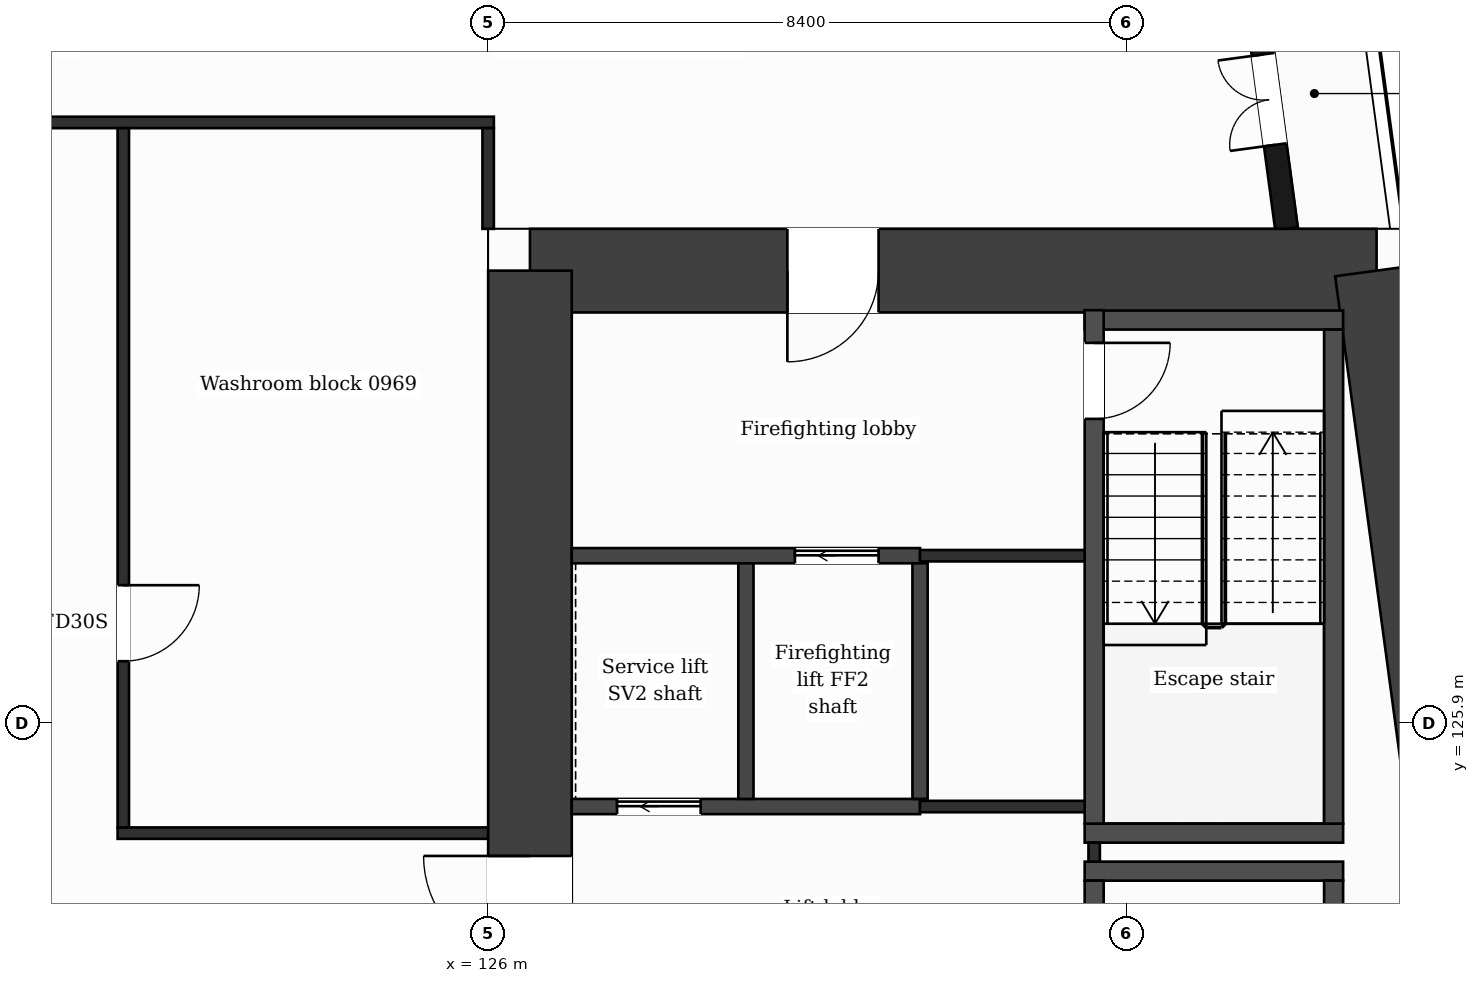
"""IFC4 building model, lengths in metres.
Left out: names, types, materials, properties, quantities, classifications, styles, units other than length and angle.
Written with IfcOpenShell. Run it as: python <this file> out.ifc"""

import sys

from ifc_helpers import new_model, si_unit, direction, frame, frame_2d, origin, place, context, subcontext, project, spatial, rectangle, extrude, element, fill, save


model = new_model("IFC4")
c1 = context("Model", 3, precision=1e-05, world=origin(), true_north=direction((0.0, 1.0)))
c2 = subcontext(c1, "Body", "Model", "MODEL_VIEW")
j1 = project(units=[si_unit("LENGTHUNIT", "METRE"), si_unit("PLANEANGLEUNIT", "RADIAN")], contexts=[c1])
p1 = place(None, origin())
s1 = spatial("IfcSite", under=j1, at=p1, CompositionType="ELEMENT")
p2 = place(p1, origin())
s2 = spatial("IfcBuilding", under=s1, at=p2, CompositionType="ELEMENT")
p3 = place(p2, frame((0.0, 0.0, 49.5)))
s3 = spatial("IfcBuildingStorey", under=s2, at=p3, CompositionType="ELEMENT", Elevation=49.5)
p4 = place(p3, frame((126.55, 131.85, 0.0), z_axis=(0.0, 0.0, 1.0), x_axis=(1.0, 0.0, 0.0)))
e1 = element("IfcWall", 1, at=p4, inside=s3, PredefinedType="SHEAR", context=c2, shape_type="SweptSolid", body=[
    extrude(rectangle(XDim=11.138, YDim=1.1, at=frame_2d((5.569, 0.0))), origin(), (0.0, 0.0, 1.0), 3.5),
])
p5 = place(p4, frame((3.386, 0.0, 0.0)))
e2 = element("IfcOpeningElement", 2, at=p5, cuts=e1, PredefinedType="OPENING", context=c2, shape_type="SweptSolid", body=[
    extrude(rectangle(XDim=1.2, YDim=2.1, at=frame_2d((0.6, 1.05))), frame((0.0, 0.56, 0.0), z_axis=(0.0, -1.0, 0.0), x_axis=(1.0, 0.0, 0.0)), (0.0, 0.0, 1.0), 1.12),
])
p6 = place(p3, frame((137.688, 131.85, 0.0), z_axis=(0.0, 0.0, 1.0), x_axis=(0.133411793472, -0.991060691059, 0.0)))
e3 = element("IfcWall", 3, at=p6, inside=s3, PredefinedType="SHEAR", context=c2, shape_type="SweptSolid", body=[
    extrude(rectangle(XDim=21.089, YDim=1.1, at=frame_2d((10.544, 0.0))), origin(), (0.0, 0.0, 1.0), 3.5),
])
p7 = place(p3, frame((126.55, 110.95, 0.0), z_axis=(0.0, 0.0, 1.0), x_axis=(0.0, 1.0, 0.0)))
e4 = element("IfcWall", 4, at=p7, inside=s3, PredefinedType="SHEAR", context=c2, shape_type="SweptSolid", body=[
    extrude(rectangle(XDim=20.9, YDim=1.1, at=frame_2d((10.45, 0.0))), origin(), (0.0, 0.0, 1.0), 3.5),
])
p8 = place(p7, frame((11.8, 0.0, 0.0)))
e5 = element("IfcOpeningElement", 5, at=p8, cuts=e4, PredefinedType="OPENING", context=c2, shape_type="SweptSolid", body=[
    extrude(rectangle(XDim=1.4, YDim=2.1, at=frame_2d((0.7, 1.05))), frame((0.0, 0.56, 0.0), z_axis=(0.0, -1.0, 0.0), x_axis=(1.0, 0.0, 0.0)), (0.0, 0.0, 1.0), 1.12),
])
p9 = place(p3, frame((136.504, 132.4, 0.0), z_axis=(0.0, 0.0, 1.0), x_axis=(-0.133399697462, 0.99106231929, 0.0)))
e6 = element("IfcWall", 6, at=p9, inside=s3, PredefinedType="SOLIDWALL", context=c2, shape_type="SweptSolid", body=[
    extrude(rectangle(XDim=6.74, YDim=0.3, at=frame_2d((3.37, 0.0))), origin(), (0.0, 0.0, 1.0), 3.18),
])
p10 = place(p9, frame((1.115, 0.0, 0.0)))
e7 = element("IfcOpeningElement", 7, at=p10, cuts=e6, PredefinedType="OPENING", context=c2, shape_type="SweptSolid", body=[
    extrude(rectangle(XDim=1.2, YDim=2.4, at=frame_2d((0.6, 1.2))), frame((0.0, 0.16, 0.0), z_axis=(0.0, -1.0, 0.0), x_axis=(1.0, 0.0, 0.0)), (0.0, 0.0, 1.0), 0.32),
])
p11 = place(p9, frame((4.436, 0.0, 0.9)))
e8 = element("IfcOpeningElement", 8, at=p11, cuts=e6, PredefinedType="OPENING", context=c2, shape_type="SweptSolid", body=[
    extrude(rectangle(XDim=1.2, YDim=2.1, at=frame_2d((0.6, 1.05))), frame((0.0, 0.16, 0.0), z_axis=(0.0, -1.0, 0.0), x_axis=(1.0, 0.0, 0.0)), (0.0, 0.0, 1.0), 0.32),
])
for number, where, z_axis, x_axis in (
    (9, (133.848, 123.95, 0.0), (0.0, 0.0, 1.0), (1.0, 0.0, 0.0)),
    (10, (133.848, 124.45, 0.0), (0.0, 0.0, 1.0), (1.0, 0.0, 0.0)),
):
    element("IfcWall", number, at=place(p3, frame(where, z_axis=z_axis, x_axis=x_axis)), inside=s3, PredefinedType="PARTITIONING", context=c2, shape_type="SweptSolid", body=[
        extrude(rectangle(XDim=3.4, YDim=0.25, at=frame_2d((1.7, 0.0))), origin(), (0.0, 0.0, 1.0), 3.18),
    ])
p12 = place(p3, frame((121.125, 124.45, 0.0), z_axis=(0.0, 0.0, 1.0), x_axis=(1.0, 0.0, 0.0)))
e11 = element("IfcWall", 11, at=p12, inside=s3, PredefinedType="PARTITIONING", context=c2, shape_type="SweptSolid", body=[
    extrude(rectangle(XDim=4.875, YDim=0.15, at=frame_2d((2.438, 0.0))), origin(), (0.0, 0.0, 1.0), 3.18),
])
p13 = place(p3, frame((127.1, 124.8, 0.0), z_axis=(0.0, 0.0, 1.0), x_axis=(1.0, 0.0, 0.0)))
e12 = element("IfcWall", 12, at=p13, inside=s3, PredefinedType="PARTITIONING", context=c2, shape_type="SweptSolid", body=[
    extrude(rectangle(XDim=4.582, YDim=0.2, at=frame_2d((2.291, 0.0))), origin(), (0.0, 0.0, 1.0), 3.18),
])
p14 = place(p13, frame((0.596, 0.0, 0.0)))
e13 = element("IfcOpeningElement", 13, at=p14, cuts=e12, PredefinedType="OPENING", context=c2, shape_type="SweptSolid", body=[
    extrude(rectangle(XDim=1.1, YDim=2.1, at=frame_2d((0.55, 1.05))), frame((0.0, 0.11, 0.0), z_axis=(0.0, -1.0, 0.0), x_axis=(1.0, 0.0, 0.0)), (0.0, 0.0, 1.0), 0.22),
])
p15 = place(p3, frame((131.682, 124.8, 0.0), z_axis=(0.0, 0.0, 1.0), x_axis=(1.0, 0.0, 0.0)))
e14 = element("IfcWall", 14, at=p15, inside=s3, PredefinedType="PARTITIONING", context=c2, shape_type="SweptSolid", body=[
    extrude(rectangle(XDim=2.416, YDim=0.15, at=frame_2d((1.208, 0.0))), origin(), (0.0, 0.0, 1.0), 3.18),
])
p16 = place(p3, frame((127.1, 128.1, 0.0), z_axis=(0.0, 0.0, 1.0), x_axis=(1.0, 0.0, 0.0)))
e15 = element("IfcWall", 15, at=p16, inside=s3, PredefinedType="PARTITIONING", context=c2, shape_type="SweptSolid", body=[
    extrude(rectangle(XDim=4.582, YDim=0.2, at=frame_2d((2.291, 0.0))), origin(), (0.0, 0.0, 1.0), 3.18),
])
p17 = place(p16, frame((2.936, 0.0, 0.0)))
e16 = element("IfcOpeningElement", 16, at=p17, cuts=e15, PredefinedType="OPENING", context=c2, shape_type="SweptSolid", body=[
    extrude(rectangle(XDim=1.1, YDim=2.1, at=frame_2d((0.55, 1.05))), frame((0.0, 0.11, 0.0), z_axis=(0.0, -1.0, 0.0), x_axis=(1.0, 0.0, 0.0)), (0.0, 0.0, 1.0), 0.22),
])
p18 = place(p3, frame((131.682, 128.1, 0.0), z_axis=(0.0, 0.0, 1.0), x_axis=(1.0, 0.0, 0.0)))
e17 = element("IfcWall", 17, at=p18, inside=s3, PredefinedType="PARTITIONING", context=c2, shape_type="SweptSolid", body=[
    extrude(rectangle(XDim=2.291, YDim=0.15, at=frame_2d((1.146, 0.0))), origin(), (0.0, 0.0, 1.0), 3.18),
])
p19 = place(p3, frame((133.848, 131.2, 0.0), z_axis=(0.0, 0.0, 1.0), x_axis=(1.0, 0.0, 0.0)))
e18 = element("IfcWall", 18, at=p19, inside=s3, PredefinedType="PARTITIONING", context=c2, shape_type="SweptSolid", body=[
    extrude(rectangle(XDim=3.4, YDim=0.25, at=frame_2d((1.7, 0.0))), origin(), (0.0, 0.0, 1.0), 3.18),
])
p20 = place(p3, frame((100.725, 133.8, 0.0), z_axis=(0.0, 0.0, 1.0), x_axis=(1.0, 0.0, 0.0)))
e19 = element("IfcWall", 19, at=p20, inside=s3, PredefinedType="PARTITIONING", context=c2, shape_type="SweptSolid", body=[
    extrude(rectangle(XDim=25.35, YDim=0.15, at=frame_2d((12.675, 0.0))), origin(), (0.0, 0.0, 1.0), 3.18),
])
p21 = place(p3, frame((121.2, 124.525, 0.0), z_axis=(0.0, 0.0, 1.0), x_axis=(0.0, 1.0, 0.0)))
e20 = element("IfcWall", 20, at=p21, inside=s3, PredefinedType="PARTITIONING", context=c2, shape_type="SweptSolid", body=[
    extrude(rectangle(XDim=9.2, YDim=0.15, at=frame_2d((4.6, 0.0))), origin(), (0.0, 0.0, 1.0), 3.18),
])
p22 = place(p21, frame((2.187, 0.0, 0.0)))
e21 = element("IfcOpeningElement", 21, at=p22, cuts=e20, PredefinedType="OPENING", context=c2, shape_type="SweptSolid", body=[
    extrude(rectangle(XDim=1.0, YDim=2.1, at=frame_2d((0.5, 1.05))), frame((0.0, 0.085, 0.0), z_axis=(0.0, -1.0, 0.0), x_axis=(1.0, 0.0, 0.0)), (0.0, 0.0, 1.0), 0.17),
])
p23 = place(p3, frame((126.0, 132.4, 0.0), z_axis=(0.0, 0.0, 1.0), x_axis=(0.0, 1.0, 0.0)))
e22 = element("IfcWall", 22, at=p23, inside=s3, PredefinedType="PARTITIONING", context=c2, shape_type="SweptSolid", body=[
    extrude(rectangle(XDim=1.325, YDim=0.15, at=frame_2d((0.663, 0.0))), origin(), (0.0, 0.0, 1.0), 3.18),
])
for number, where, z_axis, x_axis in (
    (23, (129.391, 124.9, 0.0), (0.0, 0.0, 1.0), (0.0, 1.0, 0.0)),
    (24, (131.682, 124.9, 0.0), (0.0, 0.0, 1.0), (0.0, 1.0, 0.0)),
):
    element("IfcWall", number, at=place(p3, frame(where, z_axis=z_axis, x_axis=x_axis)), inside=s3, PredefinedType="PARTITIONING", context=c2, shape_type="SweptSolid", body=[
        extrude(rectangle(XDim=3.1, YDim=0.2, at=frame_2d((1.55, 0.0))), origin(), (0.0, 0.0, 1.0), 3.18),
    ])
p24 = place(p3, frame((133.973, 124.075, 0.0), z_axis=(0.0, 0.0, 1.0), x_axis=(0.0, 1.0, 0.0)))
e25 = element("IfcWall", 25, at=p24, inside=s3, PredefinedType="PARTITIONING", context=c2, shape_type="SweptSolid", body=[
    extrude(rectangle(XDim=0.25, YDim=0.15, at=frame_2d((0.125, 0.0))), origin(), (0.0, 0.0, 1.0), 3.18),
])
p25 = place(p3, frame((133.973, 117.07, 0.0), z_axis=(0.0, 0.0, 1.0), x_axis=(0.0, 1.0, 0.0)))
e26 = element("IfcWall", 26, at=p25, inside=s3, PredefinedType="PARTITIONING", context=c2, shape_type="SweptSolid", body=[
    extrude(rectangle(XDim=6.755, YDim=0.25, at=frame_2d((3.377, 0.0))), origin(), (0.0, 0.0, 1.0), 3.18),
])
p26 = place(p25, frame((5.455, 0.0, 0.0)))
e27 = element("IfcOpeningElement", 27, at=p26, cuts=e26, PredefinedType="OPENING", context=c2, shape_type="SweptSolid", body=[
    extrude(rectangle(XDim=0.95, YDim=2.1, at=frame_2d((0.475, 1.05))), frame((0.0, 0.135, 0.0), z_axis=(0.0, -1.0, 0.0), x_axis=(1.0, 0.0, 0.0)), (0.0, 0.0, 1.0), 0.27),
])
p27 = place(p3, frame((133.973, 124.575, 0.0), z_axis=(0.0, 0.0, 1.0), x_axis=(0.0, 1.0, 0.0)))
e28 = element("IfcWall", 28, at=p27, inside=s3, PredefinedType="PARTITIONING", context=c2, shape_type="SweptSolid", body=[
    extrude(rectangle(XDim=6.755, YDim=0.25, at=frame_2d((3.377, 0.0))), origin(), (0.0, 0.0, 1.0), 3.18),
])
p28 = place(p27, frame((5.325, 0.0, 0.0)))
e29 = element("IfcOpeningElement", 29, at=p28, cuts=e28, PredefinedType="OPENING", context=c2, shape_type="SweptSolid", body=[
    extrude(rectangle(XDim=1.0, YDim=2.1, at=frame_2d((0.5, 1.05))), frame((0.0, 0.135, 0.0), z_axis=(0.0, -1.0, 0.0), x_axis=(1.0, 0.0, 0.0)), (0.0, 0.0, 1.0), 0.27),
])
p29 = place(p3, frame((137.123, 117.07, 0.0), z_axis=(0.0, 0.0, 1.0), x_axis=(0.0, 1.0, 0.0)))
e30 = element("IfcWall", 30, at=p29, inside=s3, PredefinedType="PARTITIONING", context=c2, shape_type="SweptSolid", body=[
    extrude(rectangle(XDim=6.755, YDim=0.25, at=frame_2d((3.377, 0.0))), origin(), (0.0, 0.0, 1.0), 3.18),
])
p30 = place(p3, frame((137.123, 124.575, 0.0), z_axis=(0.0, 0.0, 1.0), x_axis=(0.0, 1.0, 0.0)))
e31 = element("IfcWall", 31, at=p30, inside=s3, PredefinedType="PARTITIONING", context=c2, shape_type="SweptSolid", body=[
    extrude(rectangle(XDim=6.5, YDim=0.25, at=frame_2d((3.25, 0.0))), origin(), (0.0, 0.0, 1.0), 3.18),
])
p31 = place(p10, origin())
e32 = element("IfcDoor", 32, at=p31, inside=s3, OperationType="DOUBLE_DOOR_SINGLE_SWING", PredefinedType="DOOR", context=c2, shape_type="SweptSolid", body=[
    extrude(rectangle(XDim=1.2, YDim=2.4, at=frame_2d((0.6, 1.2))), frame((0.0, 0.025, 0.0), z_axis=(0.0, -1.0, 0.0), x_axis=(1.0, 0.0, 0.0)), (0.0, 0.0, 1.0), 0.05),
])
fill(e7, e32)
p32 = place(p17, origin())
e33 = element("IfcDoor", 33, at=p32, inside=s3, OperationType="SLIDING_TO_LEFT", PredefinedType="DOOR", context=c2, shape_type="SweptSolid", body=[
    extrude(rectangle(XDim=1.1, YDim=2.1, at=frame_2d((0.55, 1.05))), frame((0.0, 0.025, 0.0), z_axis=(0.0, -1.0, 0.0), x_axis=(1.0, 0.0, 0.0)), (0.0, 0.0, 1.0), 0.05),
])
fill(e16, e33)
p33 = place(p14, origin())
e34 = element("IfcDoor", 34, at=p33, inside=s3, OperationType="SLIDING_TO_LEFT", PredefinedType="DOOR", context=c2, shape_type="SweptSolid", body=[
    extrude(rectangle(XDim=1.1, YDim=2.1, at=frame_2d((0.55, 1.05))), frame((0.0, 0.025, 0.0), z_axis=(0.0, -1.0, 0.0), x_axis=(1.0, 0.0, 0.0)), (0.0, 0.0, 1.0), 0.05),
])
fill(e13, e34)
p34 = place(p28, origin())
e35 = element("IfcDoor", 35, at=p34, inside=s3, OperationType="SINGLE_SWING_RIGHT", PredefinedType="DOOR", context=c2, shape_type="SweptSolid", body=[
    extrude(rectangle(XDim=1.0, YDim=2.1, at=frame_2d((0.5, 1.05))), frame((0.0, 0.025, 0.0), z_axis=(0.0, -1.0, 0.0), x_axis=(1.0, 0.0, 0.0)), (0.0, 0.0, 1.0), 0.05),
])
fill(e29, e35)
p35 = place(p22, origin())
e36 = element("IfcDoor", 36, at=p35, inside=s3, OperationType="SINGLE_SWING_RIGHT", PredefinedType="DOOR", context=c2, shape_type="SweptSolid", body=[
    extrude(rectangle(XDim=1.0, YDim=2.1, at=frame_2d((0.5, 1.05))), frame((0.0, 0.025, 0.0), z_axis=(0.0, -1.0, 0.0), x_axis=(1.0, 0.0, 0.0)), (0.0, 0.0, 1.0), 0.05),
])
fill(e21, e36)
p36 = place(p5, origin())
e37 = element("IfcDoor", 37, at=p36, inside=s3, OperationType="SINGLE_SWING_LEFT", PredefinedType="DOOR", context=c2, shape_type="SweptSolid", body=[
    extrude(rectangle(XDim=1.2, YDim=2.1, at=frame_2d((0.6, 1.05))), frame((0.0, 0.025, 0.0), z_axis=(0.0, -1.0, 0.0), x_axis=(1.0, 0.0, 0.0)), (0.0, 0.0, 1.0), 0.05),
])
fill(e2, e37)
p37 = place(p8, origin())
e38 = element("IfcDoor", 38, at=p37, inside=s3, OperationType="SINGLE_SWING_RIGHT", PredefinedType="DOOR", context=c2, shape_type="SweptSolid", body=[
    extrude(rectangle(XDim=1.4, YDim=2.1, at=frame_2d((0.7, 1.05))), frame((0.0, 0.025, 0.0), z_axis=(0.0, -1.0, 0.0), x_axis=(1.0, 0.0, 0.0)), (0.0, 0.0, 1.0), 0.05),
])
fill(e5, e38)
save(model, sys.argv[1])
